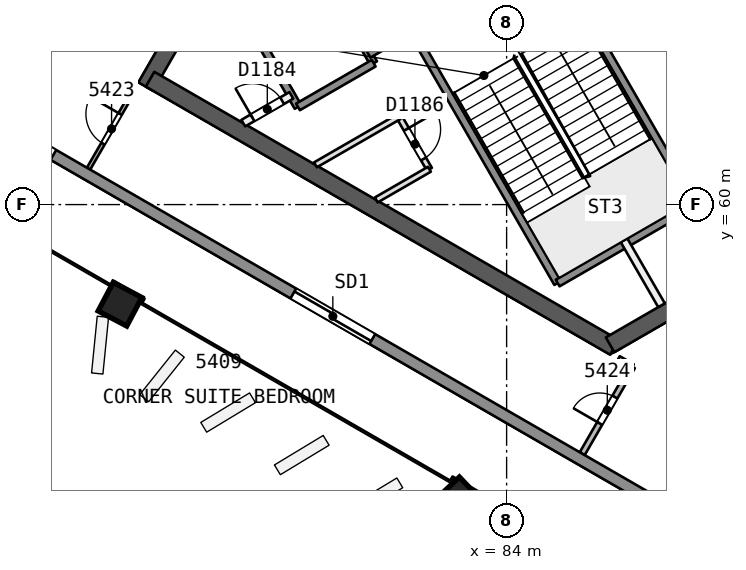
"""IFC4 building model, lengths in metres.
Left out: names, types, materials, properties, quantities, classifications, styles, units other than length and angle.
Written with IfcOpenShell. Run it as: python <this file> out.ifc"""

import sys

from ifc_helpers import new_model, si_unit, direction, frame, frame_2d, origin, origin_2d, place, context, subcontext, project, spatial, rectangle, extrude, element, fill, save


model = new_model("IFC4")
c1 = context("Model", 3, precision=1e-05, world=origin(), true_north=direction((0.0, 1.0)))
c2 = subcontext(c1, "Body", "Model", "MODEL_VIEW")
j1 = project(units=[si_unit("LENGTHUNIT", "METRE"), si_unit("PLANEANGLEUNIT", "RADIAN")], contexts=[c1])
p1 = place(None, origin())
s1 = spatial("IfcSite", under=j1, at=p1, CompositionType="ELEMENT")
p2 = place(p1, origin())
s2 = spatial("IfcBuilding", under=s1, at=p2, CompositionType="ELEMENT")
p3 = place(p2, frame((0.0, 0.0, 220.6)))
s3 = spatial("IfcBuildingStorey", under=s2, at=p3, CompositionType="ELEMENT", Elevation=220.6)
p4 = place(p3, frame((79.63, 71.981, 0.0), z_axis=(0.0, 0.0, 1.0), x_axis=(-0.500002171595, -0.86602415001, 0.0)))
e1 = element("IfcWall", 1, at=p4, inside=s3, PredefinedType="SHEAR", context=c2, shape_type="SweptSolid", body=[
    extrude(rectangle(XDim=10.25, YDim=0.45, at=frame_2d((5.125, 0.0))), origin(), (0.0, 0.0, 1.0), 3.7),
])
p5 = place(p4, frame((0.82, 0.0, 0.0)))
e2 = element("IfcOpeningElement", 2, at=p5, cuts=e1, PredefinedType="OPENING", context=c2, shape_type="SweptSolid", body=[
    extrude(rectangle(XDim=1.2, YDim=2.1, at=frame_2d((0.6, 1.05))), frame((0.0, 0.235, 0.0), z_axis=(0.0, -1.0, 0.0), x_axis=(1.0, 0.0, 0.0)), (0.0, 0.0, 1.0), 0.471),
])
p6 = place(p3, frame((74.617, 63.299, 0.0), z_axis=(0.0, 0.0, 1.0), x_axis=(0.86602594008, -0.499999071108, 0.0)))
e3 = element("IfcWall", 3, at=p6, inside=s3, PredefinedType="SHEAR", context=c2, shape_type="SweptSolid", body=[
    extrude(rectangle(XDim=14.108, YDim=0.45, at=frame_2d((7.054, 0.0))), origin(), (0.0, 0.0, 1.0), 3.7),
])
p7 = place(p3, frame((86.723, 56.31, 0.0), z_axis=(0.0, 0.0, 1.0), x_axis=(0.866042179588, 0.49997094233, 0.0)))
e4 = element("IfcWall", 4, at=p7, inside=s3, PredefinedType="SHEAR", context=c2, shape_type="SweptSolid", body=[
    extrude(rectangle(XDim=3.515, YDim=0.45, at=frame_2d((1.758, 0.0))), origin(), (0.0, 0.0, 1.0), 3.7),
])
p8 = place(p3, frame((73.825, 57.351, 0.0), z_axis=(0.000857578916, 0.022824792675, 0.999739112668), x_axis=(-0.499939349571, -0.865824899744, 0.020196280228)))
e5 = element("IfcColumn", 5, at=p8, inside=s3, PredefinedType="COLUMN", context=c2, shape_type="SweptSolid", body=[
    extrude(rectangle(XDim=0.85, YDim=0.85, at=origin_2d()), origin(), (0.0, 0.0, 1.0), 3.701),
])
p9 = place(p3, frame((82.752, 52.197, 0.0), z_axis=(-0.00837646992, 0.028097450282, 0.999570091609), x_axis=(-0.499671890349, -0.865980240747, 0.02015501501)))
e6 = element("IfcColumn", 6, at=p9, inside=s3, PredefinedType="COLUMN", context=c2, shape_type="SweptSolid", body=[
    extrude(rectangle(XDim=0.85, YDim=0.85, at=origin_2d()), origin(), (0.0, 0.0, 1.0), 3.702),
])
p10 = place(p3, frame((69.219, 63.127, 0.0), z_axis=(0.0, 0.0, 1.0), x_axis=(0.499993317952, 0.866029261632, 0.0)))
e7 = element("IfcWall", 7, at=p10, inside=s3, PredefinedType="PARTITIONING", context=c2, shape_type="SweptSolid", body=[
    extrude(rectangle(XDim=10.403, YDim=0.2, at=frame_2d((5.202, 0.0))), origin(), (0.0, 0.0, 1.0), 3.3),
])
p11 = place(p3, frame((72.999, 60.945, 0.0), z_axis=(0.0, 0.0, 1.0), x_axis=(0.49995203611, 0.866053093978, 0.0)))
e8 = element("IfcWall", 8, at=p11, inside=s3, PredefinedType="PARTITIONING", context=c2, shape_type="SweptSolid", body=[
    extrude(rectangle(XDim=2.424, YDim=0.1, at=frame_2d((1.212, 0.0))), origin(), (0.0, 0.0, 1.0), 3.3),
])
p12 = place(p11, frame((0.762, 0.0, 0.0)))
e9 = element("IfcOpeningElement", 9, at=p12, cuts=e8, PredefinedType="OPENING", context=c2, shape_type="SweptSolid", body=[
    extrude(rectangle(XDim=0.9, YDim=2.1, at=frame_2d((0.45, 1.05))), frame((0.0, 0.061, 0.0), z_axis=(0.0, -1.0, 0.0), x_axis=(1.0, 0.0, 0.0)), (0.0, 0.0, 1.0), 0.121),
])
p13 = place(p3, frame((85.989, 53.445, 0.0), z_axis=(0.0, 0.0, 1.0), x_axis=(0.50000507839, 0.866022471755, 0.0)))
e10 = element("IfcWall", 10, at=p13, inside=s3, PredefinedType="PARTITIONING", context=c2, shape_type="SweptSolid", body=[
    extrude(rectangle(XDim=2.642, YDim=0.15, at=frame_2d((1.321, 0.0))), origin(), (0.0, 0.0, 1.0), 3.3),
])
p14 = place(p13, frame((0.921, 0.0, 0.0)))
e11 = element("IfcOpeningElement", 11, at=p14, cuts=e10, PredefinedType="OPENING", context=c2, shape_type="SweptSolid", body=[
    extrude(rectangle(XDim=0.8, YDim=2.1, at=frame_2d((0.4, 1.05))), frame((0.0, 0.085, 0.0), z_axis=(0.0, -1.0, 0.0), x_axis=(1.0, 0.0, 0.0)), (0.0, 0.0, 1.0), 0.171),
])
p15 = place(p3, frame((87.31, 55.733, 0.0), z_axis=(0.0, 0.0, 1.0), x_axis=(-0.8659754619, 0.500086491905, 0.0)))
e12 = element("IfcWall", 12, at=p15, inside=s3, PredefinedType="PARTITIONING", context=c2, shape_type="SweptSolid", body=[
    extrude(rectangle(XDim=0.426, YDim=0.15, at=frame_2d((0.213, 0.0))), origin(), (0.0, 0.0, 1.0), 3.3),
])
p16 = place(p3, frame((92.652, 54.619, 0.0), z_axis=(0.0, 0.0, 1.0), x_axis=(-0.866044673852, -0.499966621779, 0.0)))
e13 = element("IfcWall", 13, at=p16, inside=s3, PredefinedType="SOLIDWALL", context=c2, shape_type="SweptSolid", body=[
    extrude(rectangle(XDim=5.193, YDim=0.3, at=frame_2d((2.597, 0.0))), origin(), (0.0, 0.0, 1.0), 3.3),
])
p17 = place(p3, frame((88.155, 52.022, 0.0), z_axis=(0.0, 0.0, 1.0), x_axis=(-0.866024521231, 0.500001528624, 0.0)))
e14 = element("IfcWall", 14, at=p17, inside=s3, PredefinedType="SOLIDWALL", context=c2, shape_type="SweptSolid", body=[
    extrude(rectangle(XDim=50.762, YDim=0.3, at=frame_2d((25.381, 0.0))), origin(), (0.0, 0.0, 1.0), 3.3),
])
p18 = place(p17, frame((23.402, 0.0, 0.0)))
e15 = element("IfcOpeningElement", 15, at=p18, cuts=e14, PredefinedType="OPENING", context=c2, shape_type="SweptSolid", body=[
    extrude(rectangle(XDim=2.4, YDim=2.4, at=frame_2d((1.2, 1.2))), frame((0.0, 0.161, 0.0), z_axis=(0.0, -1.0, 0.0), x_axis=(1.0, 0.0, 0.0)), (0.0, 0.0, 1.0), 0.321),
])
p19 = place(p17, frame((29.013, 0.0, 0.0)))
e16 = element("IfcOpeningElement", 16, at=p19, cuts=e14, PredefinedType="OPENING", context=c2, shape_type="SweptSolid", body=[
    extrude(rectangle(XDim=2.4, YDim=2.4, at=frame_2d((1.2, 1.2))), frame((0.0, 0.161, 0.0), z_axis=(0.0, -1.0, 0.0), x_axis=(1.0, 0.0, 0.0)), (0.0, 0.0, 1.0), 0.321),
])
p20 = place(p17, frame((39.492, 0.0, 0.0)))
e17 = element("IfcOpeningElement", 17, at=p20, cuts=e14, PredefinedType="OPENING", context=c2, shape_type="SweptSolid", body=[
    extrude(rectangle(XDim=2.4, YDim=2.4, at=frame_2d((1.2, 1.2))), frame((0.0, 0.161, 0.0), z_axis=(0.0, -1.0, 0.0), x_axis=(1.0, 0.0, 0.0)), (0.0, 0.0, 1.0), 0.321),
])
p21 = place(p17, frame((18.569, 0.0, 0.0)))
e18 = element("IfcOpeningElement", 18, at=p21, cuts=e14, PredefinedType="OPENING", context=c2, shape_type="SweptSolid", body=[
    extrude(rectangle(XDim=2.4, YDim=2.4, at=frame_2d((1.2, 1.2))), frame((0.0, 0.161, 0.0), z_axis=(0.0, -1.0, 0.0), x_axis=(1.0, 0.0, 0.0)), (0.0, 0.0, 1.0), 0.321),
])
p22 = place(p17, frame((8.878, 0.0, 0.0)))
e19 = element("IfcOpeningElement", 19, at=p22, cuts=e14, PredefinedType="OPENING", context=c2, shape_type="SweptSolid", body=[
    extrude(rectangle(XDim=2.4, YDim=2.4, at=frame_2d((1.2, 1.2))), frame((0.0, 0.161, 0.0), z_axis=(0.0, -1.0, 0.0), x_axis=(1.0, 0.0, 0.0)), (0.0, 0.0, 1.0), 0.321),
])
p23 = place(p3, frame((77.135, 64.952, 0.0), z_axis=(0.0, 0.0, 1.0), x_axis=(0.499996545922, -0.866027397988, 0.0)))
e20 = element("IfcWall", 20, at=p23, inside=s3, PredefinedType="SOLIDWALL", context=c2, shape_type="SweptSolid", body=[
    extrude(rectangle(XDim=2.75, YDim=0.2, at=frame_2d((1.375, 0.0))), origin(), (0.0, 0.0, 1.0), 3.3),
])
p24 = place(p3, frame((81.169, 62.315, 0.0), z_axis=(0.0, 0.0, 1.0), x_axis=(0.499995408039, -0.866028054938, 0.0)))
e21 = element("IfcWall", 21, at=p24, inside=s3, PredefinedType="PARTITIONING", context=c2, shape_type="SweptSolid", body=[
    extrude(rectangle(XDim=1.6, YDim=0.15, at=frame_2d((0.8, 0.0))), origin(), (0.0, 0.0, 1.0), 3.3),
])
p25 = place(p24, frame((0.387, 0.0, 0.0)))
e22 = element("IfcOpeningElement", 22, at=p25, cuts=e21, PredefinedType="OPENING", context=c2, shape_type="SweptSolid", body=[
    extrude(rectangle(XDim=0.9, YDim=2.1, at=frame_2d((0.45, 1.05))), frame((0.0, 0.085, 0.0), z_axis=(0.0, -1.0, 0.0), x_axis=(1.0, 0.0, 0.0)), (0.0, 0.0, 1.0), 0.171),
])
p26 = place(p3, frame((79.127, 66.102, 0.0), z_axis=(0.0, 0.0, 1.0), x_axis=(0.499996545922, -0.866027397988, 0.0)))
e23 = element("IfcWall", 23, at=p26, inside=s3, PredefinedType="SOLIDWALL", context=c2, shape_type="SweptSolid", body=[
    extrude(rectangle(XDim=2.75, YDim=0.2, at=frame_2d((1.375, 0.0))), origin(), (0.0, 0.0, 1.0), 3.3),
])
p27 = place(p3, frame((81.493, 64.604, 0.0), z_axis=(0.0, 0.0, 1.0), x_axis=(0.500006057782, -0.866021906294, 0.0)))
e24 = element("IfcWall", 24, at=p27, inside=s3, PredefinedType="SOLIDWALL", context=c2, shape_type="SweptSolid", body=[
    extrude(rectangle(XDim=7.7, YDim=0.2, at=frame_2d((3.85, 0.0))), origin(), (0.0, 0.0, 1.0), 3.3),
])
p28 = place(p3, frame((87.09, 59.06, 0.0), z_axis=(0.0, 0.0, 1.0), x_axis=(0.500011643316, -0.866018681408, 0.0)))
e25 = element("IfcWall", 25, at=p28, inside=s3, PredefinedType="PARTITIONING", context=c2, shape_type="SweptSolid", body=[
    extrude(rectangle(XDim=1.973, YDim=0.2, at=frame_2d((0.987, 0.0))), origin(), (0.0, 0.0, 1.0), 3.3),
])
p29 = place(p3, frame((85.087, 66.679, 0.0), z_axis=(0.0, 0.0, 1.0), x_axis=(0.500019787375, -0.866013979237, 0.0)))
e26 = element("IfcWall", 26, at=p29, inside=s3, PredefinedType="SOLIDWALL", context=c2, shape_type="SweptSolid", body=[
    extrude(rectangle(XDim=7.7, YDim=0.2, at=frame_2d((3.85, 0.0))), origin(), (0.0, 0.0, 1.0), 3.3),
])
p30 = place(p29, frame((0.55, 0.0, 0.0)))
e27 = element("IfcOpeningElement", 27, at=p30, cuts=e26, PredefinedType="OPENING", context=c2, shape_type="SweptSolid", body=[
    extrude(rectangle(XDim=1.1, YDim=2.1, at=frame_2d((0.55, 1.05))), frame((0.0, 0.11, 0.0), z_axis=(0.0, -1.0, 0.0), x_axis=(1.0, 0.0, 0.0)), (0.0, 0.0, 1.0), 0.221),
])
p31 = place(p3, frame((77.07, 62.143, 0.0), z_axis=(0.0, 0.0, 1.0), x_axis=(0.866013036001, 0.500021421018, 0.0)))
e28 = element("IfcWall", 28, at=p31, inside=s3, PredefinedType="PARTITIONING", context=c2, shape_type="SweptSolid", body=[
    extrude(rectangle(XDim=1.461, YDim=0.2, at=frame_2d((0.73, 0.0))), origin(), (0.0, 0.0, 1.0), 3.3),
])
p32 = place(p31, frame((0.281, 0.0, 0.0)))
e29 = element("IfcOpeningElement", 29, at=p32, cuts=e28, PredefinedType="OPENING", context=c2, shape_type="SweptSolid", body=[
    extrude(rectangle(XDim=0.9, YDim=2.1, at=frame_2d((0.45, 1.05))), frame((0.0, 0.11, 0.0), z_axis=(0.0, -1.0, 0.0), x_axis=(1.0, 0.0, 0.0)), (0.0, 0.0, 1.0), 0.221),
])
p33 = place(p3, frame((80.367, 63.954, 0.0), z_axis=(0.0, 0.0, 1.0), x_axis=(0.866026575979, 0.499997969693, 0.0)))
e30 = element("IfcWall", 30, at=p33, inside=s3, PredefinedType="SOLIDWALL", context=c2, shape_type="SweptSolid", body=[
    extrude(rectangle(XDim=6.75, YDim=0.2, at=frame_2d((3.375, 0.0))), origin(), (0.0, 0.0, 1.0), 3.3),
])
p34 = place(p3, frame((78.51, 62.57, 0.0), z_axis=(0.0, 0.0, 1.0), x_axis=(0.866053019151, 0.499952165731, 0.0)))
e31 = element("IfcWall", 31, at=p34, inside=s3, PredefinedType="SOLIDWALL", context=c2, shape_type="SweptSolid", body=[
    extrude(rectangle(XDim=2.3, YDim=0.2, at=frame_2d((1.15, 0.0))), origin(), (0.0, 0.0, 1.0), 3.3),
])
p35 = place(p3, frame((78.97, 61.046, 0.0), z_axis=(0.0, 0.0, 1.0), x_axis=(0.866033475577, 0.499986018985, 0.0)))
e32 = element("IfcWall", 32, at=p35, inside=s3, PredefinedType="PARTITIONING", context=c2, shape_type="SweptSolid", body=[
    extrude(rectangle(XDim=2.539, YDim=0.15, at=frame_2d((1.27, 0.0))), origin(), (0.0, 0.0, 1.0), 3.3),
])
p36 = place(p3, frame((80.57, 60.122, 0.0), z_axis=(0.0, 0.0, 1.0), x_axis=(0.866039608017, 0.49997539674, 0.0)))
e33 = element("IfcWall", 33, at=p36, inside=s3, PredefinedType="PARTITIONING", context=c2, shape_type="SweptSolid", body=[
    extrude(rectangle(XDim=1.615, YDim=0.15, at=frame_2d((0.808, 0.0))), origin(), (0.0, 0.0, 1.0), 3.3),
])
p37 = place(p3, frame((85.343, 57.935, 0.0), z_axis=(0.0, 0.0, 1.0), x_axis=(0.866004344652, 0.500036473714, 0.0)))
e34 = element("IfcWall", 34, at=p37, inside=s3, PredefinedType="SOLIDWALL", context=c2, shape_type="SweptSolid", body=[
    extrude(rectangle(XDim=4.15, YDim=0.2, at=frame_2d((2.075, 0.0))), origin(), (0.0, 0.0, 1.0), 3.3),
])
p38 = place(p12, origin())
e35 = element("IfcDoor", 35, at=p38, inside=s3, OperationType="SINGLE_SWING_RIGHT", PredefinedType="NOTDEFINED", context=c2, shape_type="SweptSolid", body=[
    extrude(rectangle(XDim=0.9, YDim=2.1, at=frame_2d((0.45, 1.05))), frame((0.0, 0.025, 0.0), z_axis=(0.0, -1.0, 0.0), x_axis=(1.0, 0.0, 0.0)), (0.0, 0.0, 1.0), 0.05),
])
fill(e9, e35)
p39 = place(p14, origin())
e36 = element("IfcDoor", 36, at=p39, inside=s3, OperationType="SINGLE_SWING_LEFT", PredefinedType="NOTDEFINED", context=c2, shape_type="SweptSolid", body=[
    extrude(rectangle(XDim=0.8, YDim=2.1, at=frame_2d((0.4, 1.05))), frame((0.0, 0.025, 0.0), z_axis=(0.0, -1.0, 0.0), x_axis=(1.0, 0.0, 0.0)), (0.0, 0.0, 1.0), 0.05),
])
fill(e11, e36)
p40 = place(p21, origin())
e37 = element("IfcDoor", 37, at=p40, inside=s3, OperationType="SLIDING_TO_RIGHT", PredefinedType="NOTDEFINED", context=c2, shape_type="SweptSolid", body=[
    extrude(rectangle(XDim=2.4, YDim=2.4, at=frame_2d((1.2, 1.2))), frame((0.0, 0.025, 0.0), z_axis=(0.0, -1.0, 0.0), x_axis=(1.0, 0.0, 0.0)), (0.0, 0.0, 1.0), 0.05),
])
fill(e18, e37)
p41 = place(p22, origin())
e38 = element("IfcDoor", 38, at=p41, inside=s3, OperationType="SLIDING_TO_LEFT", PredefinedType="NOTDEFINED", context=c2, shape_type="SweptSolid", body=[
    extrude(rectangle(XDim=2.4, YDim=2.4, at=frame_2d((1.2, 1.2))), frame((0.0, 0.025, 0.0), z_axis=(0.0, -1.0, 0.0), x_axis=(1.0, 0.0, 0.0)), (0.0, 0.0, 1.0), 0.05),
])
fill(e19, e38)
p42 = place(p32, origin())
e39 = element("IfcDoor", 39, at=p42, inside=s3, OperationType="SINGLE_SWING_LEFT", PredefinedType="NOTDEFINED", context=c2, shape_type="SweptSolid", body=[
    extrude(rectangle(XDim=0.9, YDim=2.1, at=frame_2d((0.45, 1.05))), frame((0.0, 0.025, 0.0), z_axis=(0.0, -1.0, 0.0), x_axis=(1.0, 0.0, 0.0)), (0.0, 0.0, 1.0), 0.05),
])
fill(e29, e39)
p43 = place(p25, origin())
e40 = element("IfcDoor", 40, at=p43, inside=s3, OperationType="SINGLE_SWING_LEFT", PredefinedType="NOTDEFINED", context=c2, shape_type="SweptSolid", body=[
    extrude(rectangle(XDim=0.9, YDim=2.1, at=frame_2d((0.45, 1.05))), frame((0.0, 0.025, 0.0), z_axis=(0.0, -1.0, 0.0), x_axis=(1.0, 0.0, 0.0)), (0.0, 0.0, 1.0), 0.05),
])
fill(e22, e40)
save(model, sys.argv[1])
